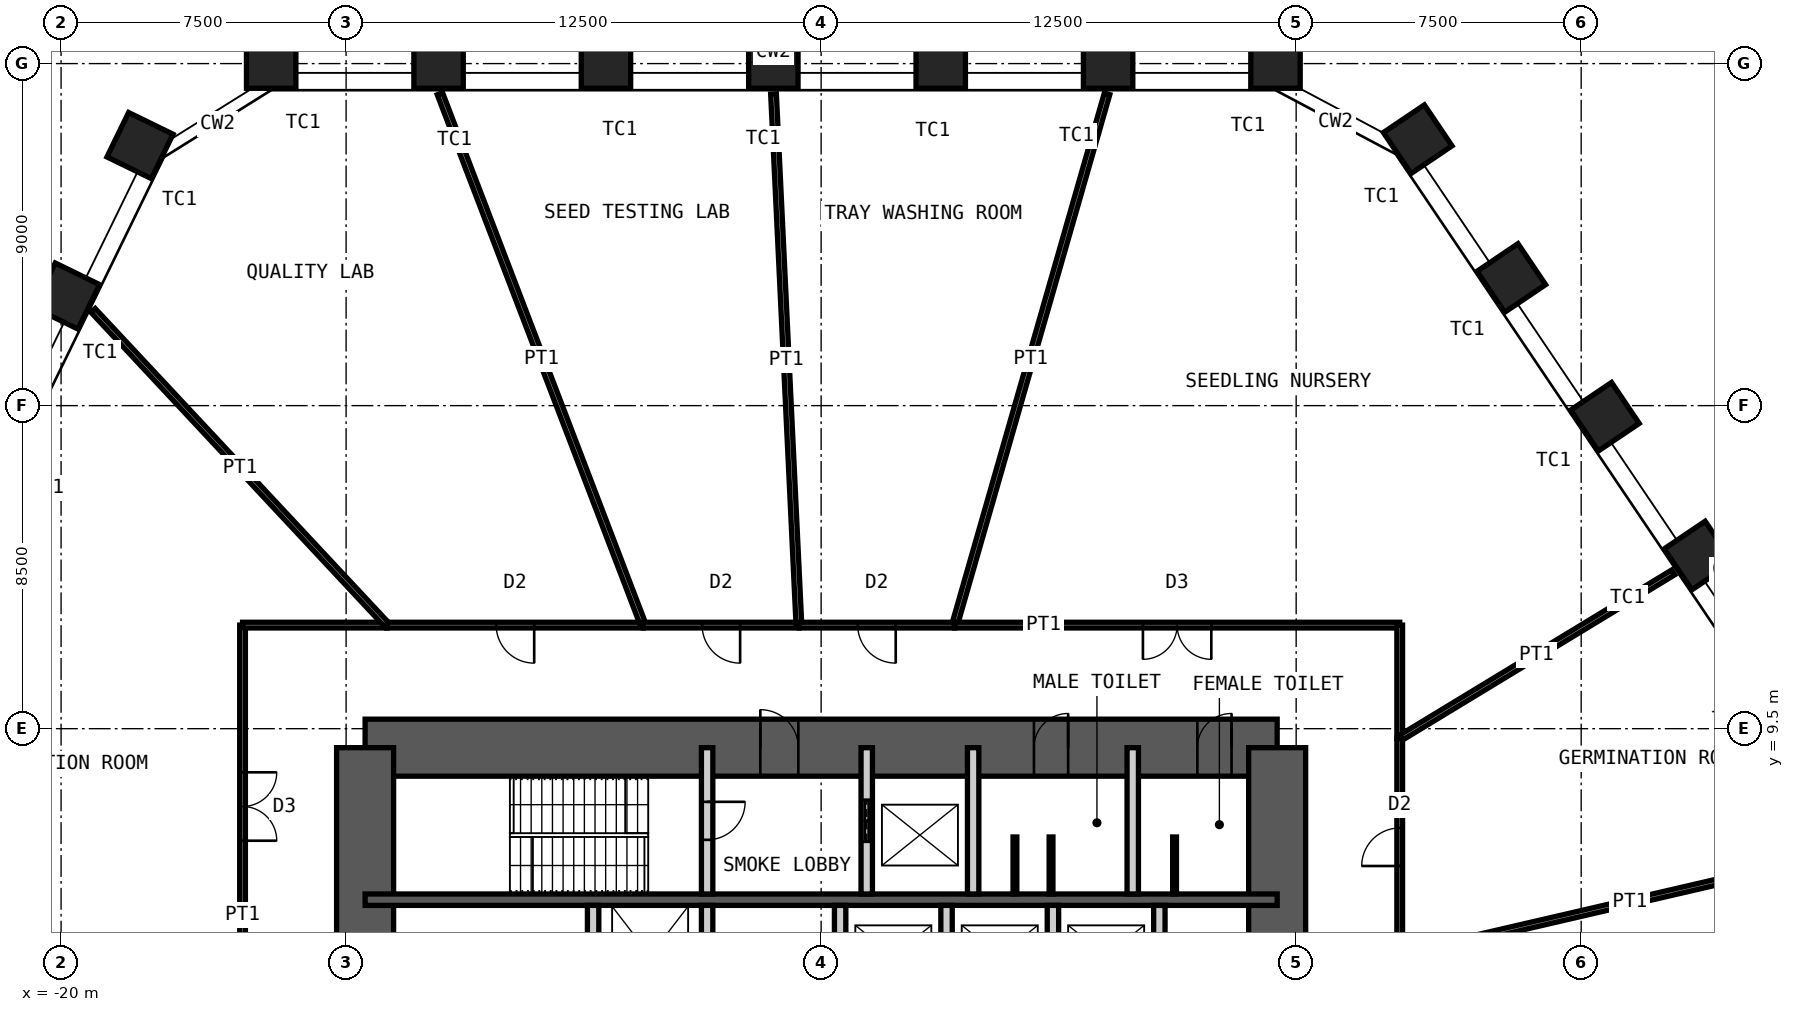
"""IFC4 building model, lengths in metres.
Left out: names, types, materials, properties, quantities, classifications, styles, units other than length and angle.
Written with IfcOpenShell. Run it as: python <this file> out.ifc"""

import sys

from ifc_helpers import new_model, si_unit, direction, frame, frame_2d, origin, origin_2d, place, context, subcontext, project, spatial, rectangle, hollow_rectangle, extrude, element, fill, save


model = new_model("IFC4")
c1 = context("Model", 3, precision=1e-05, world=origin(), true_north=direction((0.0, 1.0)))
c2 = subcontext(c1, "Body", "Model", "MODEL_VIEW")
j1 = project(units=[si_unit("LENGTHUNIT", "METRE"), si_unit("PLANEANGLEUNIT", "RADIAN")], contexts=[c1])
p1 = place(None, origin())
s1 = spatial("IfcSite", under=j1, at=p1, CompositionType="ELEMENT")
p2 = place(p1, origin())
s2 = spatial("IfcBuilding", under=s1, at=p2, CompositionType="ELEMENT")
p3 = place(p2, frame((0.0, 0.0, 32.0)))
s3 = spatial("IfcBuildingStorey", under=s2, at=p3, CompositionType="ELEMENT", Elevation=32.0)
for number, where, z_axis, x_axis in (
    (1, (-14.471, 27.0, 0.0), (0.0, 0.0, 1.0), (-1.0, 0.0, 0.0)),
    (2, (-10.067, 27.0, 0.0), (0.0, 0.0, 1.0), (-1.0, 0.0, 0.0)),
    (3, (-5.662, 27.0, 0.0), (0.0, 0.0, 1.0), (-1.0, 0.0, 0.0)),
    (4, (-1.258, 27.0, 0.0), (0.0, 0.0, 1.0), (-1.0, 0.0, 0.0)),
    (5, (3.147, 27.0, 0.0), (0.0, 0.0, 1.0), (-1.0, 0.0, 0.0)),
    (6, (7.552, 27.0, 0.0), (0.0, 0.0, 1.0), (-1.0, 0.0, 0.0)),
    (7, (11.956, 27.0, 0.0), (0.0, 0.0, 1.0), (-1.0, 0.0, 0.0)),
    (8, (15.698, 25.01, 0.0), (0.0, 0.0, 1.0), (-0.559, 0.829, 0.0)),
    (9, (18.161, 21.359, 0.0), (0.0, 0.0, 1.0), (-0.559, 0.829, 0.0)),
    (10, (20.624, 17.707, 0.0), (0.0, 0.0, 1.0), (-0.559, 0.829, 0.0)),
    (11, (23.087, 14.056, 0.0), (0.0, 0.0, 1.0), (-0.559, 0.829, 0.0)),
    (12, (-19.854, 20.884, 0.0), (0.0, 0.0, 1.0), (-0.438, -0.899, 0.0)),
    (13, (-17.924, 24.843, 0.0), (0.0, 0.0, 1.0), (-0.438, -0.899, 0.0)),
):
    element("IfcColumn", number, at=place(p3, frame(where, z_axis=z_axis, x_axis=x_axis)), inside=s3, PredefinedType="COLUMN", context=c2, shape_type="SweptSolid", body=[
        extrude(hollow_rectangle(XDim=1.3, YDim=1.3, WallThickness=0.1, at=origin_2d()), origin(), (0.0, 0.0, 1.0), 5.0),
    ])
p4 = place(p3, frame((-12.0, 9.0, 0.0), z_axis=(0.0, 0.0, 1.0), x_axis=(1.0, 0.0, 0.0)))
e14 = element("IfcWall", 14, at=p4, inside=s3, PredefinedType="SHEAR", context=c2, shape_type="SweptSolid", body=[
    extrude(rectangle(XDim=24.0, YDim=1.5, at=frame_2d((12.0, 0.0))), origin(), (0.0, 0.0, 1.0), 5.0),
])
p5 = place(p4, frame((10.4, 0.0, 0.0)))
e15 = element("IfcOpeningElement", 15, at=p5, cuts=e14, PredefinedType="OPENING", context=c2, shape_type="SweptSolid", body=[
    extrude(rectangle(XDim=1.0, YDim=2.1, at=frame_2d((0.5, 1.05))), frame((0.0, 0.76, 0.0), z_axis=(0.0, -1.0, 0.0), x_axis=(1.0, 0.0, 0.0)), (0.0, 0.0, 1.0), 1.52),
])
p6 = place(p4, frame((17.6, 0.0, 0.0)))
e16 = element("IfcOpeningElement", 16, at=p6, cuts=e14, PredefinedType="OPENING", context=c2, shape_type="SweptSolid", body=[
    extrude(rectangle(XDim=0.9, YDim=2.1, at=frame_2d((0.45, 1.05))), frame((0.0, 0.76, 0.0), z_axis=(0.0, -1.0, 0.0), x_axis=(1.0, 0.0, 0.0)), (0.0, 0.0, 1.0), 1.52),
])
p7 = place(p4, frame((21.9, 0.0, 0.0)))
e17 = element("IfcOpeningElement", 17, at=p7, cuts=e14, PredefinedType="OPENING", context=c2, shape_type="SweptSolid", body=[
    extrude(rectangle(XDim=0.9, YDim=2.1, at=frame_2d((0.45, 1.05))), frame((0.0, 0.76, 0.0), z_axis=(0.0, -1.0, 0.0), x_axis=(1.0, 0.0, 0.0)), (0.0, 0.0, 1.0), 1.52),
])
p8 = place(p3, frame((12.0, -9.0, 0.0), z_axis=(0.0, 0.0, 1.0), x_axis=(0.0, 1.0, 0.0)))
e18 = element("IfcWall", 18, at=p8, inside=s3, PredefinedType="SHEAR", context=c2, shape_type="SweptSolid", body=[
    extrude(rectangle(XDim=18.0, YDim=1.5, at=frame_2d((9.0, 0.0))), origin(), (0.0, 0.0, 1.0), 5.0),
])
p9 = place(p8, frame((8.1, 0.0, 0.0)))
e19 = element("IfcOpeningElement", 19, at=p9, cuts=e18, PredefinedType="OPENING", context=c2, shape_type="SweptSolid", body=[
    extrude(rectangle(XDim=1.8, YDim=2.1, at=frame_2d((0.9, 1.05))), frame((0.0, 0.76, 0.0), z_axis=(0.0, -1.0, 0.0), x_axis=(1.0, 0.0, 0.0)), (0.0, 0.0, 1.0), 1.52),
])
p10 = place(p3, frame((-12.0, -9.0, 0.0), z_axis=(0.0, 0.0, 1.0), x_axis=(0.0, 1.0, 0.0)))
e20 = element("IfcWall", 20, at=p10, inside=s3, PredefinedType="SHEAR", context=c2, shape_type="SweptSolid", body=[
    extrude(rectangle(XDim=18.0, YDim=1.5, at=frame_2d((9.0, 0.0))), origin(), (0.0, 0.0, 1.0), 5.0),
])
p11 = place(p10, frame((8.1, 0.0, 0.0)))
e21 = element("IfcOpeningElement", 21, at=p11, cuts=e20, PredefinedType="OPENING", context=c2, shape_type="SweptSolid", body=[
    extrude(rectangle(XDim=1.8, YDim=2.1, at=frame_2d((0.9, 1.05))), frame((0.0, 0.76, 0.0), z_axis=(0.0, -1.0, 0.0), x_axis=(1.0, 0.0, 0.0)), (0.0, 0.0, 1.0), 1.52),
])
p12 = place(p3, frame((-12.0, 5.0, 0.0), z_axis=(0.0, 0.0, 1.0), x_axis=(1.0, 0.0, 0.0)))
e22 = element("IfcWall", 22, at=p12, inside=s3, PredefinedType="SHEAR", context=c2, shape_type="SweptSolid", body=[
    extrude(rectangle(XDim=24.0, YDim=0.3, at=frame_2d((12.0, 0.0))), origin(), (0.0, 0.0, 1.0), 5.0),
])
p13 = place(p3, frame((-3.0, 5.15, 0.0), z_axis=(0.0, 0.0, 1.0), x_axis=(0.0, 1.0, 0.0)))
e23 = element("IfcWall", 23, at=p13, inside=s3, PredefinedType="PARTITIONING", context=c2, shape_type="SweptSolid", body=[
    extrude(rectangle(XDim=3.85, YDim=0.3, at=frame_2d((1.925, 0.0))), origin(), (0.0, 0.0, 1.0), 4.78),
])
p14 = place(p13, frame((1.425, 0.0, 0.0)))
e24 = element("IfcOpeningElement", 24, at=p14, cuts=e23, PredefinedType="OPENING", context=c2, shape_type="SweptSolid", body=[
    extrude(rectangle(XDim=1.0, YDim=2.1, at=frame_2d((0.5, 1.05))), frame((0.0, 0.16, 0.0), z_axis=(0.0, -1.0, 0.0), x_axis=(1.0, 0.0, 0.0)), (0.0, 0.0, 1.0), 0.32),
])
p15 = place(p3, frame((1.2, 5.15, 0.0), z_axis=(0.0, 0.0, 1.0), x_axis=(0.0, 1.0, 0.0)))
e25 = element("IfcWall", 25, at=p15, inside=s3, PredefinedType="PARTITIONING", context=c2, shape_type="SweptSolid", body=[
    extrude(rectangle(XDim=3.85, YDim=0.3, at=frame_2d((1.925, 0.0))), origin(), (0.0, 0.0, 1.0), 4.78),
])
p16 = place(p15, frame((1.375, 0.0, 0.0)))
e26 = element("IfcOpeningElement", 26, at=p16, cuts=e25, PredefinedType="OPENING", context=c2, shape_type="SweptSolid", body=[
    extrude(rectangle(XDim=1.1, YDim=2.4, at=frame_2d((0.55, 1.2))), frame((0.0, 0.16, 0.0), z_axis=(0.0, -1.0, 0.0), x_axis=(1.0, 0.0, 0.0)), (0.0, 0.0, 1.0), 0.32),
])
for number, where, z_axis, x_axis in (
    (27, (4.0, 5.15, 0.0), (0.0, 0.0, 1.0), (0.0, 1.0, 0.0)),
    (28, (8.2, 5.15, 0.0), (0.0, 0.0, 1.0), (0.0, 1.0, 0.0)),
):
    element("IfcWall", number, at=place(p3, frame(where, z_axis=z_axis, x_axis=x_axis)), inside=s3, PredefinedType="PARTITIONING", context=c2, shape_type="SweptSolid", body=[
        extrude(rectangle(XDim=3.85, YDim=0.3, at=frame_2d((1.925, 0.0))), origin(), (0.0, 0.0, 1.0), 4.78),
    ])
for number, where, z_axis, x_axis in (
    (29, (-6.0, 2.2, 0.0), (0.0, 0.0, 1.0), (0.0, 1.0, 0.0)),
    (30, (-3.0, 2.2, 0.0), (0.0, 0.0, 1.0), (0.0, 1.0, 0.0)),
    (31, (0.5, 2.2, 0.0), (0.0, 0.0, 1.0), (0.0, 1.0, 0.0)),
    (32, (3.3, 2.2, 0.0), (0.0, 0.0, 1.0), (0.0, 1.0, 0.0)),
    (33, (6.1, 2.2, 0.0), (0.0, 0.0, 1.0), (0.0, 1.0, 0.0)),
    (34, (8.9, 2.2, 0.0), (0.0, 0.0, 1.0), (0.0, 1.0, 0.0)),
):
    element("IfcWall", number, at=place(p3, frame(where, z_axis=z_axis, x_axis=x_axis)), inside=s3, PredefinedType="PARTITIONING", context=c2, shape_type="SweptSolid", body=[
        extrude(rectangle(XDim=2.65, YDim=0.3, at=frame_2d((1.325, 0.0))), origin(), (0.0, 0.0, 1.0), 4.78),
    ])
for number, where, z_axis, x_axis in (
    (35, (5.1, 5.15, 0.0), (0.0, 0.0, 1.0), (0.0, 1.0, 0.0)),
    (36, (6.05, 5.15, 0.0), (0.0, 0.0, 1.0), (0.0, 1.0, 0.0)),
    (37, (9.3, 5.15, 0.0), (0.0, 0.0, 1.0), (0.0, 1.0, 0.0)),
):
    element("IfcWall", number, at=place(p3, frame(where, z_axis=z_axis, x_axis=x_axis)), inside=s3, PredefinedType="PARTITIONING", context=c2, shape_type="SweptSolid", body=[
        extrude(rectangle(XDim=1.5, YDim=0.1, at=frame_2d((0.75, 0.0))), origin(), (0.0, 0.0, 1.0), 2.1),
    ])
p17 = place(p3, frame((7.524, 26.204, 0.0), z_axis=(0.0, 0.0, 1.0), x_axis=(-0.275975790041, -0.961164587004, 0.0)))
e38 = element("IfcWall", 38, at=p17, inside=s3, PredefinedType="PARTITIONING", context=c2, shape_type="SweptSolid", body=[
    extrude(rectangle(XDim=14.543, YDim=0.15, at=frame_2d((7.272, 0.0))), origin(), (0.0, 0.0, 1.0), 3.7),
])
p18 = place(p3, frame((3.51, 12.225, 0.0), z_axis=(0.0, 0.0, 1.0), x_axis=(1.0, 0.0, 0.0)))
e39 = element("IfcWall", 39, at=p18, inside=s3, PredefinedType="PARTITIONING", context=c2, shape_type="SweptSolid", body=[
    extrude(rectangle(XDim=11.715, YDim=0.15, at=frame_2d((5.857, 0.0))), origin(), (0.0, 0.0, 1.0), 4.8),
])
p19 = place(p18, frame((4.958, 0.0, 0.0)))
e40 = element("IfcOpeningElement", 40, at=p19, cuts=e39, PredefinedType="OPENING", context=c2, shape_type="SweptSolid", body=[
    extrude(rectangle(XDim=1.8, YDim=2.4, at=frame_2d((0.9, 1.2))), frame((0.0, 0.085, 0.0), z_axis=(0.0, -1.0, 0.0), x_axis=(1.0, 0.0, 0.0)), (0.0, 0.0, 1.0), 0.17),
])
p20 = place(p3, frame((15.225, 12.225, 0.0), z_axis=(0.0, 0.0, 1.0), x_axis=(0.0, -1.0, 0.0)))
e41 = element("IfcWall", 41, at=p20, inside=s3, PredefinedType="PARTITIONING", context=c2, shape_type="SweptSolid", body=[
    extrude(rectangle(XDim=2.982, YDim=0.15, at=frame_2d((1.491, 0.0))), origin(), (0.0, 0.0, 1.0), 4.8),
])
p21 = place(p3, frame((22.421, 13.612, 0.0), z_axis=(0.0, 0.0, 1.0), x_axis=(-0.854789353023, -0.518975107263, 0.0)))
e42 = element("IfcWall", 42, at=p21, inside=s3, PredefinedType="PARTITIONING", context=c2, shape_type="SweptSolid", body=[
    extrude(rectangle(XDim=8.419, YDim=0.15, at=frame_2d((4.209, 0.0))), origin(), (0.0, 0.0, 1.0), 3.7),
])
p22 = place(p3, frame((15.225, 9.243, 0.0), z_axis=(0.0, 0.0, 1.0), x_axis=(0.0, -1.0, 0.0)))
e43 = element("IfcWall", 43, at=p22, inside=s3, PredefinedType="PARTITIONING", context=c2, shape_type="SweptSolid", body=[
    extrude(rectangle(XDim=5.713, YDim=0.15, at=frame_2d((2.856, 0.0))), origin(), (0.0, 0.0, 1.0), 4.8),
])
p23 = place(p22, frame((2.356, 0.0, 0.0)))
e44 = element("IfcOpeningElement", 44, at=p23, cuts=e43, PredefinedType="OPENING", context=c2, shape_type="SweptSolid", body=[
    extrude(rectangle(XDim=1.0, YDim=2.4, at=frame_2d((0.5, 1.2))), frame((0.0, 0.085, 0.0), z_axis=(0.0, -1.0, 0.0), x_axis=(1.0, 0.0, 0.0)), (0.0, 0.0, 1.0), 0.17),
])
p24 = place(p3, frame((27.336, 6.338, 0.0), z_axis=(0.0, 0.0, 1.0), x_axis=(-0.974155334075, -0.225879138243, 0.0)))
e45 = element("IfcWall", 45, at=p24, inside=s3, PredefinedType="PARTITIONING", context=c2, shape_type="SweptSolid", body=[
    extrude(rectangle(XDim=12.432, YDim=0.15, at=frame_2d((6.216, 0.0))), origin(), (0.0, 0.0, 1.0), 3.7),
])
p25 = place(p3, frame((-26.85, 4.725, 0.0), z_axis=(0.0, 0.0, 1.0), x_axis=(0.984867773441, -0.173307440223, 0.0)))
e46 = element("IfcWall", 46, at=p25, inside=s3, PredefinedType="PARTITIONING", context=c2, shape_type="SweptSolid", body=[
    extrude(rectangle(XDim=11.804, YDim=0.15, at=frame_2d((5.902, 0.0))), origin(), (0.0, 0.0, 1.0), 3.7),
])
p26 = place(p3, frame((-15.225, 2.679, 0.0), z_axis=(0.0, 0.0, 1.0), x_axis=(0.0, 1.0, 0.0)))
e47 = element("IfcWall", 47, at=p26, inside=s3, PredefinedType="PARTITIONING", context=c2, shape_type="SweptSolid", body=[
    extrude(rectangle(XDim=9.546, YDim=0.15, at=frame_2d((4.773, 0.0))), origin(), (0.0, 0.0, 1.0), 4.8),
])
p27 = place(p26, frame((3.873, 0.0, 0.0)))
e48 = element("IfcOpeningElement", 48, at=p27, cuts=e47, PredefinedType="OPENING", context=c2, shape_type="SweptSolid", body=[
    extrude(rectangle(XDim=1.8, YDim=2.4, at=frame_2d((0.9, 1.2))), frame((0.0, 0.085, 0.0), z_axis=(0.0, -1.0, 0.0), x_axis=(1.0, 0.0, 0.0)), (0.0, 0.0, 1.0), 0.17),
])
p28 = place(p3, frame((-15.225, 12.225, 0.0), z_axis=(0.0, 0.0, 1.0), x_axis=(1.0, 0.0, 0.0)))
e49 = element("IfcWall", 49, at=p28, inside=s3, PredefinedType="PARTITIONING", context=c2, shape_type="SweptSolid", body=[
    extrude(rectangle(XDim=3.803, YDim=0.15, at=frame_2d((1.902, 0.0))), origin(), (0.0, 0.0, 1.0), 4.8),
])
p29 = place(p3, frame((-19.157, 20.504, 0.0), z_axis=(0.0, 0.0, 1.0), x_axis=(0.682695116082, -0.730703345057, 0.0)))
e50 = element("IfcWall", 50, at=p29, inside=s3, PredefinedType="PARTITIONING", context=c2, shape_type="SweptSolid", body=[
    extrude(rectangle(XDim=11.33, YDim=0.15, at=frame_2d((5.665, 0.0))), origin(), (0.0, 0.0, 1.0), 3.7),
])
p30 = place(p3, frame((-11.422, 12.225, 0.0), z_axis=(0.0, 0.0, 1.0), x_axis=(1.0, 0.0, 0.0)))
e51 = element("IfcWall", 51, at=p30, inside=s3, PredefinedType="PARTITIONING", context=c2, shape_type="SweptSolid", body=[
    extrude(rectangle(XDim=6.742, YDim=0.15, at=frame_2d((3.371, 0.0))), origin(), (0.0, 0.0, 1.0), 4.8),
])
p31 = place(p30, frame((2.871, 0.0, 0.0)))
e52 = element("IfcOpeningElement", 52, at=p31, cuts=e51, PredefinedType="OPENING", context=c2, shape_type="SweptSolid", body=[
    extrude(rectangle(XDim=1.0, YDim=2.4, at=frame_2d((0.5, 1.2))), frame((0.0, 0.085, 0.0), z_axis=(0.0, -1.0, 0.0), x_axis=(1.0, 0.0, 0.0)), (0.0, 0.0, 1.0), 0.17),
])
p32 = place(p3, frame((-10.031, 26.207, 0.0), z_axis=(0.0, 0.0, 1.0), x_axis=(0.357470544466, -0.933924413344, 0.0)))
e53 = element("IfcWall", 53, at=p32, inside=s3, PredefinedType="PARTITIONING", context=c2, shape_type="SweptSolid", body=[
    extrude(rectangle(XDim=14.971, YDim=0.15, at=frame_2d((7.485, 0.0))), origin(), (0.0, 0.0, 1.0), 3.7),
])
p33 = place(p3, frame((-4.679, 12.225, 0.0), z_axis=(0.0, 0.0, 1.0), x_axis=(1.0, 0.0, 0.0)))
e54 = element("IfcWall", 54, at=p33, inside=s3, PredefinedType="PARTITIONING", context=c2, shape_type="SweptSolid", body=[
    extrude(rectangle(XDim=4.095, YDim=0.15, at=frame_2d((2.047, 0.0))), origin(), (0.0, 0.0, 1.0), 4.8),
])
p34 = place(p33, frame((1.547, 0.0, 0.0)))
e55 = element("IfcOpeningElement", 55, at=p34, cuts=e54, PredefinedType="OPENING", context=c2, shape_type="SweptSolid", body=[
    extrude(rectangle(XDim=1.0, YDim=2.4, at=frame_2d((0.5, 1.2))), frame((0.0, 0.085, 0.0), z_axis=(0.0, -1.0, 0.0), x_axis=(1.0, 0.0, 0.0)), (0.0, 0.0, 1.0), 0.17),
])
p35 = place(p3, frame((-1.253, 26.2, 0.0), z_axis=(0.0, 0.0, 1.0), x_axis=(0.047759977782, -0.998858841139, 0.0)))
e56 = element("IfcWall", 56, at=p35, inside=s3, PredefinedType="PARTITIONING", context=c2, shape_type="SweptSolid", body=[
    extrude(rectangle(XDim=13.991, YDim=0.15, at=frame_2d((6.996, 0.0))), origin(), (0.0, 0.0, 1.0), 3.7),
])
p36 = place(p3, frame((-0.585, 12.225, 0.0), z_axis=(0.0, 0.0, 1.0), x_axis=(1.0, 0.0, 0.0)))
e57 = element("IfcWall", 57, at=p36, inside=s3, PredefinedType="PARTITIONING", context=c2, shape_type="SweptSolid", body=[
    extrude(rectangle(XDim=4.095, YDim=0.15, at=frame_2d((2.047, 0.0))), origin(), (0.0, 0.0, 1.0), 4.8),
])
p37 = place(p36, frame((1.547, 0.0, 0.0)))
e58 = element("IfcOpeningElement", 58, at=p37, cuts=e57, PredefinedType="OPENING", context=c2, shape_type="SweptSolid", body=[
    extrude(rectangle(XDim=1.0, YDim=2.4, at=frame_2d((0.5, 1.2))), frame((0.0, 0.085, 0.0), z_axis=(0.0, -1.0, 0.0), x_axis=(1.0, 0.0, 0.0)), (0.0, 0.0, 1.0), 0.17),
])
p38 = place(p5, origin())
e59 = element("IfcDoor", 59, at=p38, inside=s3, OperationType="SINGLE_SWING_RIGHT", PredefinedType="DOOR", context=c2, shape_type="SweptSolid", body=[
    extrude(rectangle(XDim=1.0, YDim=2.1, at=frame_2d((0.5, 1.05))), frame((0.0, 0.025, 0.0), z_axis=(0.0, -1.0, 0.0), x_axis=(1.0, 0.0, 0.0)), (0.0, 0.0, 1.0), 0.05),
])
fill(e15, e59)
p39 = place(p6, origin())
e60 = element("IfcDoor", 60, at=p39, inside=s3, OperationType="SINGLE_SWING_LEFT", PredefinedType="DOOR", context=c2, shape_type="SweptSolid", body=[
    extrude(rectangle(XDim=0.9, YDim=2.1, at=frame_2d((0.45, 1.05))), frame((0.0, 0.025, 0.0), z_axis=(0.0, -1.0, 0.0), x_axis=(1.0, 0.0, 0.0)), (0.0, 0.0, 1.0), 0.05),
])
fill(e16, e60)
p40 = place(p7, origin())
e61 = element("IfcDoor", 61, at=p40, inside=s3, OperationType="SINGLE_SWING_LEFT", PredefinedType="DOOR", context=c2, shape_type="SweptSolid", body=[
    extrude(rectangle(XDim=0.9, YDim=2.1, at=frame_2d((0.45, 1.05))), frame((0.0, 0.025, 0.0), z_axis=(0.0, -1.0, 0.0), x_axis=(1.0, 0.0, 0.0)), (0.0, 0.0, 1.0), 0.05),
])
fill(e17, e61)
p41 = place(p14, origin())
e62 = element("IfcDoor", 62, at=p41, inside=s3, OperationType="SINGLE_SWING_RIGHT", PredefinedType="DOOR", context=c2, shape_type="SweptSolid", body=[
    extrude(rectangle(XDim=1.0, YDim=2.1, at=frame_2d((0.5, 1.05))), frame((0.0, 0.025, 0.0), z_axis=(0.0, -1.0, 0.0), x_axis=(1.0, 0.0, 0.0)), (0.0, 0.0, 1.0), 0.05),
])
fill(e24, e62)
p42 = place(p16, origin())
e63 = element("IfcDoor", 63, at=p42, inside=s3, OperationType="DOUBLE_DOOR_SLIDING", PredefinedType="DOOR", context=c2, shape_type="SweptSolid", body=[
    extrude(rectangle(XDim=1.1, YDim=2.4, at=frame_2d((0.55, 1.2))), frame((0.0, 0.025, 0.0), z_axis=(0.0, -1.0, 0.0), x_axis=(1.0, 0.0, 0.0)), (0.0, 0.0, 1.0), 0.05),
])
fill(e26, e63)
p43 = place(p19, origin())
e64 = element("IfcDoor", 64, at=p43, inside=s3, OperationType="DOUBLE_DOOR_DOUBLE_SWING", PredefinedType="DOOR", context=c2, shape_type="SweptSolid", body=[
    extrude(rectangle(XDim=1.8, YDim=2.4, at=frame_2d((0.9, 1.2))), frame((0.0, 0.025, 0.0), z_axis=(0.0, -1.0, 0.0), x_axis=(1.0, 0.0, 0.0)), (0.0, 0.0, 1.0), 0.05),
])
fill(e40, e64)
p44 = place(p23, origin())
e65 = element("IfcDoor", 65, at=p44, inside=s3, OperationType="SINGLE_SWING_RIGHT", PredefinedType="DOOR", context=c2, shape_type="SweptSolid", body=[
    extrude(rectangle(XDim=1.0, YDim=2.4, at=frame_2d((0.5, 1.2))), frame((0.0, 0.025, 0.0), z_axis=(0.0, -1.0, 0.0), x_axis=(1.0, 0.0, 0.0)), (0.0, 0.0, 1.0), 0.05),
])
fill(e44, e65)
p45 = place(p27, origin())
e66 = element("IfcDoor", 66, at=p45, inside=s3, OperationType="DOUBLE_DOOR_DOUBLE_SWING", PredefinedType="DOOR", context=c2, shape_type="SweptSolid", body=[
    extrude(rectangle(XDim=1.8, YDim=2.4, at=frame_2d((0.9, 1.2))), frame((0.0, 0.025, 0.0), z_axis=(0.0, -1.0, 0.0), x_axis=(1.0, 0.0, 0.0)), (0.0, 0.0, 1.0), 0.05),
])
fill(e48, e66)
p46 = place(p31, origin())
e67 = element("IfcDoor", 67, at=p46, inside=s3, OperationType="SINGLE_SWING_RIGHT", PredefinedType="DOOR", context=c2, shape_type="SweptSolid", body=[
    extrude(rectangle(XDim=1.0, YDim=2.4, at=frame_2d((0.5, 1.2))), frame((0.0, 0.025, 0.0), z_axis=(0.0, -1.0, 0.0), x_axis=(1.0, 0.0, 0.0)), (0.0, 0.0, 1.0), 0.05),
])
fill(e52, e67)
p47 = place(p34, origin())
e68 = element("IfcDoor", 68, at=p47, inside=s3, OperationType="SINGLE_SWING_RIGHT", PredefinedType="DOOR", context=c2, shape_type="SweptSolid", body=[
    extrude(rectangle(XDim=1.0, YDim=2.4, at=frame_2d((0.5, 1.2))), frame((0.0, 0.025, 0.0), z_axis=(0.0, -1.0, 0.0), x_axis=(1.0, 0.0, 0.0)), (0.0, 0.0, 1.0), 0.05),
])
fill(e55, e68)
p48 = place(p37, origin())
e69 = element("IfcDoor", 69, at=p48, inside=s3, OperationType="SINGLE_SWING_RIGHT", PredefinedType="DOOR", context=c2, shape_type="SweptSolid", body=[
    extrude(rectangle(XDim=1.0, YDim=2.4, at=frame_2d((0.5, 1.2))), frame((0.0, 0.025, 0.0), z_axis=(0.0, -1.0, 0.0), x_axis=(1.0, 0.0, 0.0)), (0.0, 0.0, 1.0), 0.05),
])
fill(e58, e69)
save(model, sys.argv[1])
